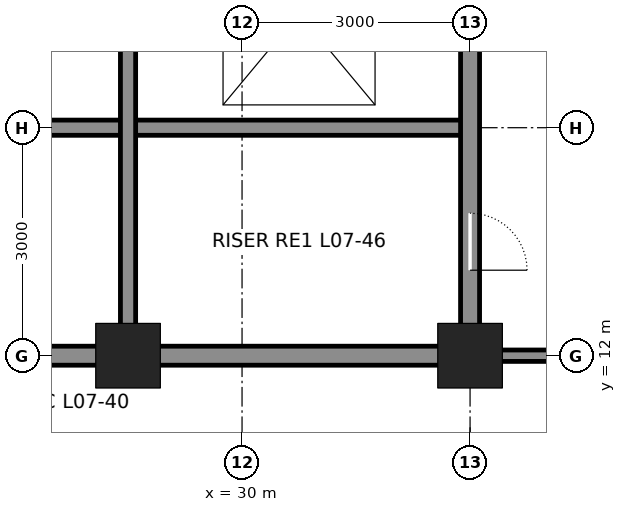
"""IFC4 building model, lengths in metres.
Left out: names, types, materials, properties, quantities, classifications, styles, units other than length and angle.
Written with IfcOpenShell. Run it as: python <this file> out.ifc"""

import sys

from ifc_helpers import new_model, si_unit, direction, frame, frame_2d, origin, origin_2d, place, context, subcontext, project, spatial, rectangle, hollow_rectangle, extrude, element, fill, save


model = new_model("IFC4")
c1 = context("Model", 3, precision=1e-05, world=origin(), true_north=direction((0.0, 1.0)))
c2 = subcontext(c1, "Body", "Model", "MODEL_VIEW")
j1 = project(units=[si_unit("LENGTHUNIT", "METRE"), si_unit("PLANEANGLEUNIT", "RADIAN")], contexts=[c1])
p1 = place(None, origin())
s1 = spatial("IfcSite", under=j1, at=p1, CompositionType="ELEMENT")
p2 = place(p1, origin())
s2 = spatial("IfcBuilding", under=s1, at=p2, CompositionType="ELEMENT")
p3 = place(p2, frame((0.0, 0.0, 37.8)))
s3 = spatial("IfcBuildingStorey", under=s2, at=p3, CompositionType="ELEMENT", Elevation=37.8)
for number, where, z_axis, x_axis in (
    (1, (28.5, 12.0, 0.0), (0.0, 0.0, 1.0), (1.0, 0.0, 0.0)),
    (2, (33.0, 12.0, 0.0), (0.0, 0.0, 1.0), (1.0, 0.0, 0.0)),
):
    element("IfcColumn", number, at=place(p3, frame(where, z_axis=z_axis, x_axis=x_axis)), inside=s3, PredefinedType="COLUMN", context=c2, shape_type="SweptSolid", body=[
        extrude(hollow_rectangle(XDim=0.85, YDim=0.85, WallThickness=0.085, at=origin_2d()), origin(), (0.0, 0.0, 1.0), 4.5),
    ])
p4 = place(p3, frame((25.75, 12.0, 0.0), z_axis=(0.0, 0.0, 1.0), x_axis=(1.0, 0.0, 0.0)))
e3 = element("IfcWall", 3, at=p4, inside=s3, PredefinedType="SOLIDWALL", context=c2, shape_type="SweptSolid", body=[
    extrude(rectangle(XDim=2.5, YDim=0.25, at=frame_2d((1.25, 0.0))), origin(), (0.0, 0.0, 1.0), 3.181),
])
p5 = place(p3, frame((28.75, 12.0, 0.0), z_axis=(0.0, 0.0, 1.0), x_axis=(1.0, 0.0, 0.0)))
e4 = element("IfcWall", 4, at=p5, inside=s3, PredefinedType="SOLIDWALL", context=c2, shape_type="SweptSolid", body=[
    extrude(rectangle(XDim=4.0, YDim=0.25, at=frame_2d((2.0, 0.0))), origin(), (0.0, 0.0, 1.0), 3.181),
])
p6 = place(p3, frame((25.5, 15.0, 0.0), z_axis=(0.0, 0.0, 1.0), x_axis=(1.0, 0.0, 0.0)))
e5 = element("IfcWall", 5, at=p6, inside=s3, PredefinedType="SOLIDWALL", context=c2, shape_type="SweptSolid", body=[
    extrude(rectangle(XDim=7.5, YDim=0.2, at=frame_2d((3.75, 0.0))), origin(), (0.0, 0.0, 1.0), 4.34),
])
p7 = place(p3, frame((28.5, 12.25, 0.0), z_axis=(0.0, 0.0, 1.0), x_axis=(0.0, 1.0, 0.0)))
e6 = element("IfcWall", 6, at=p7, inside=s3, PredefinedType="SOLIDWALL", context=c2, shape_type="SweptSolid", body=[
    extrude(rectangle(XDim=8.5, YDim=0.2, at=frame_2d((4.25, 0.0))), origin(), (0.0, 0.0, 1.0), 3.413),
])
p8 = place(p3, frame((33.0, 12.25, 0.0), z_axis=(0.0, 0.0, 1.0), x_axis=(0.0, 1.0, 0.0)))
e7 = element("IfcWall", 7, at=p8, inside=s3, PredefinedType="SOLIDWALL", context=c2, shape_type="SweptSolid", body=[
    extrude(rectangle(XDim=8.5, YDim=0.25, at=frame_2d((4.25, 0.0))), origin(), (0.0, 0.0, 1.0), 3.113),
])
p9 = place(p8, frame((6.65, 0.0, 0.0)))
e8 = element("IfcOpeningElement", 8, at=p9, cuts=e7, PredefinedType="OPENING", context=c2, shape_type="SweptSolid", body=[
    extrude(rectangle(XDim=1.2, YDim=2.1, at=frame_2d((0.6, 1.05))), frame((0.0, 0.135, 0.0), z_axis=(0.0, -1.0, 0.0), x_axis=(1.0, 0.0, 0.0)), (0.0, 0.0, 1.0), 0.27),
])
p10 = place(p8, frame((0.875, 0.0, 0.0)))
e9 = element("IfcOpeningElement", 9, at=p10, cuts=e7, PredefinedType="OPENING", context=c2, shape_type="SweptSolid", body=[
    extrude(rectangle(XDim=0.75, YDim=2.1, at=frame_2d((0.375, 1.05))), frame((0.0, 0.135, 0.0), z_axis=(0.0, -1.0, 0.0), x_axis=(1.0, 0.0, 0.0)), (0.0, 0.0, 1.0), 0.27),
])
p11 = place(p3, frame((33.0, 12.0, -0.3), z_axis=(0.0, 0.0, 1.0), x_axis=(1.0, 0.0, 0.0)))
e10 = element("IfcWall", 10, at=p11, inside=s3, PredefinedType="PARTITIONING", context=c2, shape_type="SweptSolid", body=[
    extrude(rectangle(XDim=1.8, YDim=0.15, at=frame_2d((0.9, 0.0))), origin(), (0.0, 0.0, 1.0), 3.481),
])
p12 = place(p10, frame((0.75, 0.0, 0.0), z_axis=(0.0, 0.0, 1.0), x_axis=(-1.0, 0.0, 0.0)))
e11 = element("IfcDoor", 11, at=p12, inside=s3, OperationType="SINGLE_SWING_RIGHT", PredefinedType="DOOR", context=c2, shape_type="SweptSolid", body=[
    extrude(rectangle(XDim=0.75, YDim=2.1, at=frame_2d((0.375, 1.05))), frame((0.0, 0.025, 0.0), z_axis=(0.0, -1.0, 0.0), x_axis=(1.0, 0.0, 0.0)), (0.0, 0.0, 1.0), 0.05),
])
fill(e9, e11)
save(model, sys.argv[1])
